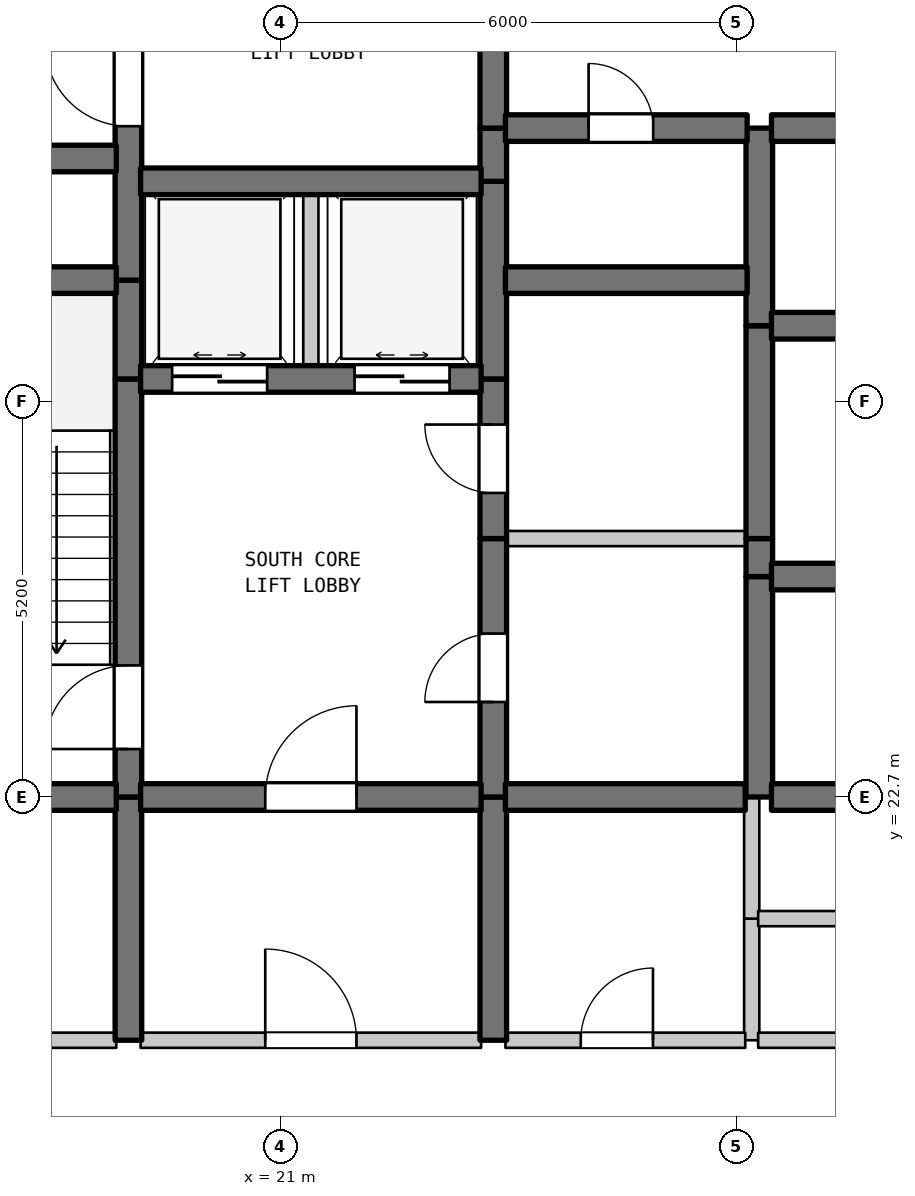
"""IFC4 building model, lengths in metres.
Left out: names, types, materials, properties, quantities, classifications, styles, units other than length and angle.
Written with IfcOpenShell. Run it as: python <this file> out.ifc"""

import sys

from ifc_helpers import new_model, si_unit, direction, frame, frame_2d, origin, place, context, subcontext, project, spatial, rectangle, extrude, element, fill, save


model = new_model("IFC4")
c1 = context("Model", 3, precision=1e-05, world=origin(), true_north=direction((0.0, 1.0)))
c2 = subcontext(c1, "Body", "Model", "MODEL_VIEW")
j1 = project(units=[si_unit("LENGTHUNIT", "METRE"), si_unit("PLANEANGLEUNIT", "RADIAN")], contexts=[c1])
p1 = place(None, origin())
s1 = spatial("IfcSite", under=j1, at=p1, CompositionType="ELEMENT")
p2 = place(p1, origin())
s2 = spatial("IfcBuilding", under=s1, at=p2, CompositionType="ELEMENT")
p3 = place(p2, frame((0.0, 0.0, 242.8)))
s3 = spatial("IfcBuildingStorey", under=s2, at=p3, CompositionType="ELEMENT", Elevation=242.8)
p4 = place(p3, frame((19.0, 19.5, 0.0), z_axis=(0.0, 0.0, 1.0), x_axis=(0.0, 1.0, 0.0)))
e1 = element("IfcWall", 1, at=p4, inside=s3, PredefinedType="SHEAR", context=c2, shape_type="SweptSolid", body=[
    extrude(rectangle(XDim=3.2, YDim=0.35, at=frame_2d((1.6, 0.0))), origin(), (0.0, 0.0, 1.0), 4.19),
])
p5 = place(p3, frame((19.0, 22.7, 0.0), z_axis=(0.0, 0.0, 1.0), x_axis=(0.0, 1.0, 0.0)))
e2 = element("IfcWall", 2, at=p5, inside=s3, PredefinedType="SHEAR", context=c2, shape_type="SweptSolid", body=[
    extrude(rectangle(XDim=5.5, YDim=0.35, at=frame_2d((2.75, 0.0))), origin(), (0.0, 0.0, 1.0), 4.19),
])
p6 = place(p5, frame((0.631, 0.0, 0.0)))
e3 = element("IfcOpeningElement", 3, at=p6, cuts=e2, PredefinedType="OPENING", context=c2, shape_type="SweptSolid", body=[
    extrude(rectangle(XDim=1.1, YDim=2.15, at=frame_2d((0.55, 1.075))), frame((0.0, 0.185, 0.0), z_axis=(0.0, -1.0, 0.0), x_axis=(1.0, 0.0, 0.0)), (0.0, 0.0, 1.0), 0.37),
])
p7 = place(p3, frame((19.0, 28.2, 0.0), z_axis=(0.0, 0.0, 1.0), x_axis=(0.0, 1.0, 0.0)))
e4 = element("IfcWall", 4, at=p7, inside=s3, PredefinedType="SHEAR", context=c2, shape_type="SweptSolid", body=[
    extrude(rectangle(XDim=1.3, YDim=0.35, at=frame_2d((0.65, 0.0))), origin(), (0.0, 0.0, 1.0), 4.19),
])
p8 = place(p3, frame((19.0, 29.5, 0.0), z_axis=(0.0, 0.0, 1.0), x_axis=(0.0, 1.0, 0.0)))
e5 = element("IfcWall", 5, at=p8, inside=s3, PredefinedType="SHEAR", context=c2, shape_type="SweptSolid", body=[
    extrude(rectangle(XDim=5.5, YDim=0.35, at=frame_2d((2.75, 0.0))), origin(), (0.0, 0.0, 1.0), 4.19),
])
p9 = place(p8, frame((2.025, 0.0, 0.0)))
e6 = element("IfcOpeningElement", 6, at=p9, cuts=e5, PredefinedType="OPENING", context=c2, shape_type="SweptSolid", body=[
    extrude(rectangle(XDim=1.1, YDim=2.15, at=frame_2d((0.55, 1.075))), frame((0.0, 0.185, 0.0), z_axis=(0.0, -1.0, 0.0), x_axis=(1.0, 0.0, 0.0)), (0.0, 0.0, 1.0), 0.37),
])
p10 = place(p3, frame((21.4, 28.2, 0.0), z_axis=(0.0, 0.0, 1.0), x_axis=(0.0, 1.0, 0.0)))
e7 = element("IfcWall", 7, at=p10, inside=s3, PredefinedType="STANDARD", context=c2, shape_type="SweptSolid", body=[
    extrude(rectangle(XDim=2.6, YDim=0.2, at=frame_2d((1.3, 0.0))), origin(), (0.0, 0.0, 1.0), 4.19),
])
p11 = place(p3, frame((23.8, 19.5, 0.0), z_axis=(0.0, 0.0, 1.0), x_axis=(0.0, 1.0, 0.0)))
e8 = element("IfcWall", 8, at=p11, inside=s3, PredefinedType="SHEAR", context=c2, shape_type="SweptSolid", body=[
    extrude(rectangle(XDim=3.2, YDim=0.35, at=frame_2d((1.6, 0.0))), origin(), (0.0, 0.0, 1.0), 4.19),
])
p12 = place(p3, frame((23.8, 22.7, 0.0), z_axis=(0.0, 0.0, 1.0), x_axis=(0.0, 1.0, 0.0)))
e9 = element("IfcWall", 9, at=p12, inside=s3, PredefinedType="SHEAR", context=c2, shape_type="SweptSolid", body=[
    extrude(rectangle(XDim=3.4, YDim=0.35, at=frame_2d((1.7, 0.0))), origin(), (0.0, 0.0, 1.0), 4.19),
])
p13 = place(p12, frame((1.25, 0.0, 0.0)))
e10 = element("IfcOpeningElement", 10, at=p13, cuts=e9, PredefinedType="OPENING", context=c2, shape_type="SweptSolid", body=[
    extrude(rectangle(XDim=0.9, YDim=2.15, at=frame_2d((0.45, 1.075))), frame((0.0, 0.185, 0.0), z_axis=(0.0, -1.0, 0.0), x_axis=(1.0, 0.0, 0.0)), (0.0, 0.0, 1.0), 0.37),
])
p14 = place(p3, frame((23.8, 26.1, 0.0), z_axis=(0.0, 0.0, 1.0), x_axis=(0.0, 1.0, 0.0)))
e11 = element("IfcWall", 11, at=p14, inside=s3, PredefinedType="SHEAR", context=c2, shape_type="SweptSolid", body=[
    extrude(rectangle(XDim=2.1, YDim=0.35, at=frame_2d((1.05, 0.0))), origin(), (0.0, 0.0, 1.0), 4.19),
])
p15 = place(p14, frame((0.6, 0.0, 0.0)))
e12 = element("IfcOpeningElement", 12, at=p15, cuts=e11, PredefinedType="OPENING", context=c2, shape_type="SweptSolid", body=[
    extrude(rectangle(XDim=0.9, YDim=2.15, at=frame_2d((0.45, 1.075))), frame((0.0, 0.185, 0.0), z_axis=(0.0, -1.0, 0.0), x_axis=(1.0, 0.0, 0.0)), (0.0, 0.0, 1.0), 0.37),
])
p16 = place(p3, frame((23.8, 28.2, 0.0), z_axis=(0.0, 0.0, 1.0), x_axis=(0.0, 1.0, 0.0)))
e13 = element("IfcWall", 13, at=p16, inside=s3, PredefinedType="SHEAR", context=c2, shape_type="SweptSolid", body=[
    extrude(rectangle(XDim=2.6, YDim=0.35, at=frame_2d((1.3, 0.0))), origin(), (0.0, 0.0, 1.0), 4.19),
])
p17 = place(p3, frame((23.8, 30.8, 0.0), z_axis=(0.0, 0.0, 1.0), x_axis=(0.0, 1.0, 0.0)))
e14 = element("IfcWall", 14, at=p17, inside=s3, PredefinedType="SHEAR", context=c2, shape_type="SweptSolid", body=[
    extrude(rectangle(XDim=0.7, YDim=0.35, at=frame_2d((0.35, 0.0))), origin(), (0.0, 0.0, 1.0), 4.19),
])
p18 = place(p3, frame((23.8, 31.5, 0.0), z_axis=(0.0, 0.0, 1.0), x_axis=(0.0, 1.0, 0.0)))
e15 = element("IfcWall", 15, at=p18, inside=s3, PredefinedType="SHEAR", context=c2, shape_type="SweptSolid", body=[
    extrude(rectangle(XDim=3.5, YDim=0.35, at=frame_2d((1.75, 0.0))), origin(), (0.0, 0.0, 1.0), 4.19),
])
p19 = place(p18, frame((1.127, 0.0, 0.0)))
e16 = element("IfcOpeningElement", 16, at=p19, cuts=e15, PredefinedType="OPENING", context=c2, shape_type="SweptSolid", body=[
    extrude(rectangle(XDim=1.1, YDim=2.15, at=frame_2d((0.55, 1.075))), frame((0.0, 0.185, 0.0), z_axis=(0.0, -1.0, 0.0), x_axis=(1.0, 0.0, 0.0)), (0.0, 0.0, 1.0), 0.37),
])
p20 = place(p3, frame((27.2, 19.5, 0.0), z_axis=(0.0, 0.0, 1.0), x_axis=(0.0, 1.0, 0.0)))
e17 = element("IfcWall", 17, at=p20, inside=s3, PredefinedType="STANDARD", context=c2, shape_type="SweptSolid", body=[
    extrude(rectangle(XDim=1.6, YDim=0.2, at=frame_2d((0.8, 0.0))), origin(), (0.0, 0.0, 1.0), 4.19),
])
p21 = place(p3, frame((27.2, 21.1, 0.0), z_axis=(0.0, 0.0, 1.0), x_axis=(0.0, 1.0, 0.0)))
e18 = element("IfcWall", 18, at=p21, inside=s3, PredefinedType="STANDARD", context=c2, shape_type="SweptSolid", body=[
    extrude(rectangle(XDim=1.6, YDim=0.2, at=frame_2d((0.8, 0.0))), origin(), (0.0, 0.0, 1.0), 4.19),
])
p22 = place(p3, frame((27.3, 22.7, 0.0), z_axis=(0.0, 0.0, 1.0), x_axis=(0.0, 1.0, 0.0)))
e19 = element("IfcWall", 19, at=p22, inside=s3, PredefinedType="SHEAR", context=c2, shape_type="SweptSolid", body=[
    extrude(rectangle(XDim=2.9, YDim=0.35, at=frame_2d((1.45, 0.0))), origin(), (0.0, 0.0, 1.0), 4.19),
])
p23 = place(p3, frame((27.3, 25.6, 0.0), z_axis=(0.0, 0.0, 1.0), x_axis=(0.0, 1.0, 0.0)))
e20 = element("IfcWall", 20, at=p23, inside=s3, PredefinedType="SHEAR", context=c2, shape_type="SweptSolid", body=[
    extrude(rectangle(XDim=0.5, YDim=0.35, at=frame_2d((0.25, 0.0))), origin(), (0.0, 0.0, 1.0), 4.19),
])
p24 = place(p3, frame((27.3, 26.1, 0.0), z_axis=(0.0, 0.0, 1.0), x_axis=(0.0, 1.0, 0.0)))
e21 = element("IfcWall", 21, at=p24, inside=s3, PredefinedType="SHEAR", context=c2, shape_type="SweptSolid", body=[
    extrude(rectangle(XDim=2.8, YDim=0.35, at=frame_2d((1.4, 0.0))), origin(), (0.0, 0.0, 1.0), 4.19),
])
p25 = place(p3, frame((27.3, 28.9, 0.0), z_axis=(0.0, 0.0, 1.0), x_axis=(0.0, 1.0, 0.0)))
e22 = element("IfcWall", 22, at=p25, inside=s3, PredefinedType="SHEAR", context=c2, shape_type="SweptSolid", body=[
    extrude(rectangle(XDim=2.6, YDim=0.35, at=frame_2d((1.3, 0.0))), origin(), (0.0, 0.0, 1.0), 4.19),
])
p26 = place(p3, frame((15.16, 19.5, 0.0), z_axis=(0.0, 0.0, 1.0), x_axis=(1.0, 0.0, 0.0)))
e23 = element("IfcWall", 23, at=p26, inside=s3, PredefinedType="STANDARD", context=c2, shape_type="SweptSolid", body=[
    extrude(rectangle(XDim=3.68, YDim=0.2, at=frame_2d((1.84, 0.0))), origin(), (0.0, 0.0, 1.0), 4.19),
])
p27 = place(p26, frame((1.39, 0.0, 0.0)))
e24 = element("IfcOpeningElement", 24, at=p27, cuts=e23, PredefinedType="OPENING", context=c2, shape_type="SweptSolid", body=[
    extrude(rectangle(XDim=0.9, YDim=2.15, at=frame_2d((0.45, 1.075))), frame((0.0, 0.11, 0.0), z_axis=(0.0, -1.0, 0.0), x_axis=(1.0, 0.0, 0.0)), (0.0, 0.0, 1.0), 0.22),
])
p28 = place(p3, frame((19.16, 19.5, 0.0), z_axis=(0.0, 0.0, 1.0), x_axis=(1.0, 0.0, 0.0)))
e25 = element("IfcWall", 25, at=p28, inside=s3, PredefinedType="STANDARD", context=c2, shape_type="SweptSolid", body=[
    extrude(rectangle(XDim=4.48, YDim=0.2, at=frame_2d((2.24, 0.0))), origin(), (0.0, 0.0, 1.0), 4.19),
])
p29 = place(p28, frame((1.64, 0.0, 0.0)))
e26 = element("IfcOpeningElement", 26, at=p29, cuts=e25, PredefinedType="OPENING", context=c2, shape_type="SweptSolid", body=[
    extrude(rectangle(XDim=1.2, YDim=2.2, at=frame_2d((0.6, 1.1))), frame((0.0, 0.11, 0.0), z_axis=(0.0, -1.0, 0.0), x_axis=(1.0, 0.0, 0.0)), (0.0, 0.0, 1.0), 0.22),
])
p30 = place(p3, frame((23.96, 19.5, 0.0), z_axis=(0.0, 0.0, 1.0), x_axis=(1.0, 0.0, 0.0)))
e27 = element("IfcWall", 27, at=p30, inside=s3, PredefinedType="STANDARD", context=c2, shape_type="SweptSolid", body=[
    extrude(rectangle(XDim=3.155, YDim=0.2, at=frame_2d((1.578, 0.0))), origin(), (0.0, 0.0, 1.0), 4.19),
])
p31 = place(p30, frame((0.991, 0.0, 0.0)))
e28 = element("IfcOpeningElement", 28, at=p31, cuts=e27, PredefinedType="OPENING", context=c2, shape_type="SweptSolid", body=[
    extrude(rectangle(XDim=0.95, YDim=2.15, at=frame_2d((0.475, 1.075))), frame((0.0, 0.11, 0.0), z_axis=(0.0, -1.0, 0.0), x_axis=(1.0, 0.0, 0.0)), (0.0, 0.0, 1.0), 0.22),
])
p32 = place(p3, frame((27.285, 19.5, 0.0), z_axis=(0.0, 0.0, 1.0), x_axis=(1.0, 0.0, 0.0)))
e29 = element("IfcWall", 29, at=p32, inside=s3, PredefinedType="STANDARD", context=c2, shape_type="SweptSolid", body=[
    extrude(rectangle(XDim=3.43, YDim=0.2, at=frame_2d((1.715, 0.0))), origin(), (0.0, 0.0, 1.0), 4.19),
])
p33 = place(p32, frame((1.192, 0.0, 0.0)))
e30 = element("IfcOpeningElement", 30, at=p33, cuts=e29, PredefinedType="OPENING", context=c2, shape_type="SweptSolid", body=[
    extrude(rectangle(XDim=0.9, YDim=2.15, at=frame_2d((0.45, 1.075))), frame((0.0, 0.11, 0.0), z_axis=(0.0, -1.0, 0.0), x_axis=(1.0, 0.0, 0.0)), (0.0, 0.0, 1.0), 0.22),
])
p34 = place(p3, frame((27.285, 21.1, 0.0), z_axis=(0.0, 0.0, 1.0), x_axis=(1.0, 0.0, 0.0)))
e31 = element("IfcWall", 31, at=p34, inside=s3, PredefinedType="STANDARD", context=c2, shape_type="SweptSolid", body=[
    extrude(rectangle(XDim=3.355, YDim=0.2, at=frame_2d((1.677, 0.0))), origin(), (0.0, 0.0, 1.0), 4.19),
])
p35 = place(p3, frame((15.16, 22.7, 0.0), z_axis=(0.0, 0.0, 1.0), x_axis=(1.0, 0.0, 0.0)))
e32 = element("IfcWall", 32, at=p35, inside=s3, PredefinedType="SHEAR", context=c2, shape_type="SweptSolid", body=[
    extrude(rectangle(XDim=3.68, YDim=0.35, at=frame_2d((1.84, 0.0))), origin(), (0.0, 0.0, 1.0), 4.19),
])
p36 = place(p3, frame((19.16, 22.7, 0.0), z_axis=(0.0, 0.0, 1.0), x_axis=(1.0, 0.0, 0.0)))
e33 = element("IfcWall", 33, at=p36, inside=s3, PredefinedType="SHEAR", context=c2, shape_type="SweptSolid", body=[
    extrude(rectangle(XDim=4.48, YDim=0.35, at=frame_2d((2.24, 0.0))), origin(), (0.0, 0.0, 1.0), 4.19),
])
p37 = place(p36, frame((1.64, 0.0, 0.0)))
e34 = element("IfcOpeningElement", 34, at=p37, cuts=e33, PredefinedType="OPENING", context=c2, shape_type="SweptSolid", body=[
    extrude(rectangle(XDim=1.2, YDim=2.2, at=frame_2d((0.6, 1.1))), frame((0.0, 0.185, 0.0), z_axis=(0.0, -1.0, 0.0), x_axis=(1.0, 0.0, 0.0)), (0.0, 0.0, 1.0), 0.37),
])
p38 = place(p3, frame((23.96, 22.7, 0.0), z_axis=(0.0, 0.0, 1.0), x_axis=(1.0, 0.0, 0.0)))
e35 = element("IfcWall", 35, at=p38, inside=s3, PredefinedType="SHEAR", context=c2, shape_type="SweptSolid", body=[
    extrude(rectangle(XDim=3.155, YDim=0.35, at=frame_2d((1.578, 0.0))), origin(), (0.0, 0.0, 1.0), 4.19),
])
p39 = place(p3, frame((27.46, 22.7, 0.0), z_axis=(0.0, 0.0, 1.0), x_axis=(1.0, 0.0, 0.0)))
e36 = element("IfcWall", 36, at=p39, inside=s3, PredefinedType="SHEAR", context=c2, shape_type="SweptSolid", body=[
    extrude(rectangle(XDim=3.18, YDim=0.35, at=frame_2d((1.59, 0.0))), origin(), (0.0, 0.0, 1.0), 4.19),
])
p40 = place(p3, frame((27.46, 25.6, 0.0), z_axis=(0.0, 0.0, 1.0), x_axis=(1.0, 0.0, 0.0)))
e37 = element("IfcWall", 37, at=p40, inside=s3, PredefinedType="SHEAR", context=c2, shape_type="SweptSolid", body=[
    extrude(rectangle(XDim=3.18, YDim=0.35, at=frame_2d((1.59, 0.0))), origin(), (0.0, 0.0, 1.0), 4.19),
])
p41 = place(p40, frame((1.115, 0.0, 0.0)))
e38 = element("IfcOpeningElement", 38, at=p41, cuts=e37, PredefinedType="OPENING", context=c2, shape_type="SweptSolid", body=[
    extrude(rectangle(XDim=0.95, YDim=2.15, at=frame_2d((0.475, 1.075))), frame((0.0, 0.185, 0.0), z_axis=(0.0, -1.0, 0.0), x_axis=(1.0, 0.0, 0.0)), (0.0, 0.0, 1.0), 0.37),
])
p42 = place(p3, frame((23.96, 26.1, 0.0), z_axis=(0.0, 0.0, 1.0), x_axis=(1.0, 0.0, 0.0)))
e39 = element("IfcWall", 39, at=p42, inside=s3, PredefinedType="STANDARD", context=c2, shape_type="SweptSolid", body=[
    extrude(rectangle(XDim=3.18, YDim=0.2, at=frame_2d((1.59, 0.0))), origin(), (0.0, 0.0, 1.0), 4.19),
])
p43 = place(p3, frame((19.16, 28.2, 0.0), z_axis=(0.0, 0.0, 1.0), x_axis=(1.0, 0.0, 0.0)))
e40 = element("IfcWall", 40, at=p43, inside=s3, PredefinedType="SHEAR", context=c2, shape_type="SweptSolid", body=[
    extrude(rectangle(XDim=4.48, YDim=0.35, at=frame_2d((2.24, 0.0))), origin(), (0.0, 0.0, 1.0), 4.19),
])
p44 = place(p43, frame((0.415, 0.0, 0.0)))
e41 = element("IfcOpeningElement", 41, at=p44, cuts=e40, PredefinedType="OPENING", context=c2, shape_type="SweptSolid", body=[
    extrude(rectangle(XDim=1.25, YDim=2.2, at=frame_2d((0.625, 1.1))), frame((0.0, 0.185, 0.0), z_axis=(0.0, -1.0, 0.0), x_axis=(1.0, 0.0, 0.0)), (0.0, 0.0, 1.0), 0.37),
])
p45 = place(p43, frame((2.815, 0.0, 0.0)))
e42 = element("IfcOpeningElement", 42, at=p45, cuts=e40, PredefinedType="OPENING", context=c2, shape_type="SweptSolid", body=[
    extrude(rectangle(XDim=1.25, YDim=2.2, at=frame_2d((0.625, 1.1))), frame((0.0, 0.185, 0.0), z_axis=(0.0, -1.0, 0.0), x_axis=(1.0, 0.0, 0.0)), (0.0, 0.0, 1.0), 0.37),
])
p46 = place(p3, frame((27.46, 28.9, 0.0), z_axis=(0.0, 0.0, 1.0), x_axis=(1.0, 0.0, 0.0)))
e43 = element("IfcWall", 43, at=p46, inside=s3, PredefinedType="SHEAR", context=c2, shape_type="SweptSolid", body=[
    extrude(rectangle(XDim=3.18, YDim=0.35, at=frame_2d((1.59, 0.0))), origin(), (0.0, 0.0, 1.0), 4.19),
])
p47 = place(p46, frame((1.115, 0.0, 0.0)))
e44 = element("IfcOpeningElement", 44, at=p47, cuts=e43, PredefinedType="OPENING", context=c2, shape_type="SweptSolid", body=[
    extrude(rectangle(XDim=0.95, YDim=2.15, at=frame_2d((0.475, 1.075))), frame((0.0, 0.185, 0.0), z_axis=(0.0, -1.0, 0.0), x_axis=(1.0, 0.0, 0.0)), (0.0, 0.0, 1.0), 0.37),
])
p48 = place(p3, frame((15.16, 29.5, 0.0), z_axis=(0.0, 0.0, 1.0), x_axis=(1.0, 0.0, 0.0)))
e45 = element("IfcWall", 45, at=p48, inside=s3, PredefinedType="SHEAR", context=c2, shape_type="SweptSolid", body=[
    extrude(rectangle(XDim=3.68, YDim=0.35, at=frame_2d((1.84, 0.0))), origin(), (0.0, 0.0, 1.0), 4.19),
])
p49 = place(p3, frame((23.96, 29.5, 0.0), z_axis=(0.0, 0.0, 1.0), x_axis=(1.0, 0.0, 0.0)))
e46 = element("IfcWall", 46, at=p49, inside=s3, PredefinedType="SHEAR", context=c2, shape_type="SweptSolid", body=[
    extrude(rectangle(XDim=3.18, YDim=0.35, at=frame_2d((1.59, 0.0))), origin(), (0.0, 0.0, 1.0), 4.19),
])
p50 = place(p3, frame((19.16, 30.8, 0.0), z_axis=(0.0, 0.0, 1.0), x_axis=(1.0, 0.0, 0.0)))
e47 = element("IfcWall", 47, at=p50, inside=s3, PredefinedType="SHEAR", context=c2, shape_type="SweptSolid", body=[
    extrude(rectangle(XDim=4.48, YDim=0.35, at=frame_2d((2.24, 0.0))), origin(), (0.0, 0.0, 1.0), 4.19),
])
p51 = place(p3, frame((15.16, 31.1, 0.0), z_axis=(0.0, 0.0, 1.0), x_axis=(1.0, 0.0, 0.0)))
e48 = element("IfcWall", 48, at=p51, inside=s3, PredefinedType="SHEAR", context=c2, shape_type="SweptSolid", body=[
    extrude(rectangle(XDim=3.68, YDim=0.35, at=frame_2d((1.84, 0.0))), origin(), (0.0, 0.0, 1.0), 4.19),
])
p52 = place(p3, frame((23.96, 31.5, 0.0), z_axis=(0.0, 0.0, 1.0), x_axis=(1.0, 0.0, 0.0)))
e49 = element("IfcWall", 49, at=p52, inside=s3, PredefinedType="SHEAR", context=c2, shape_type="SweptSolid", body=[
    extrude(rectangle(XDim=3.18, YDim=0.35, at=frame_2d((1.59, 0.0))), origin(), (0.0, 0.0, 1.0), 4.19),
])
p53 = place(p52, frame((1.094, 0.0, 0.0)))
e50 = element("IfcOpeningElement", 50, at=p53, cuts=e49, PredefinedType="OPENING", context=c2, shape_type="SweptSolid", body=[
    extrude(rectangle(XDim=0.85, YDim=2.1, at=frame_2d((0.425, 1.05))), frame((0.0, 0.185, 0.0), z_axis=(0.0, -1.0, 0.0), x_axis=(1.0, 0.0, 0.0)), (0.0, 0.0, 1.0), 0.37),
])
p54 = place(p3, frame((27.46, 31.5, 0.0), z_axis=(0.0, 0.0, 1.0), x_axis=(1.0, 0.0, 0.0)))
e51 = element("IfcWall", 51, at=p54, inside=s3, PredefinedType="SHEAR", context=c2, shape_type="SweptSolid", body=[
    extrude(rectangle(XDim=3.18, YDim=0.35, at=frame_2d((1.59, 0.0))), origin(), (0.0, 0.0, 1.0), 4.19),
])
p55 = place(p6, origin())
e52 = element("IfcDoor", 52, at=p55, inside=s3, OperationType="SINGLE_SWING_LEFT", PredefinedType="DOOR", context=c2, shape_type="SweptSolid", body=[
    extrude(rectangle(XDim=1.1, YDim=2.15, at=frame_2d((0.55, 1.075))), frame((0.0, 0.025, 0.0), z_axis=(0.0, -1.0, 0.0), x_axis=(1.0, 0.0, 0.0)), (0.0, 0.0, 1.0), 0.05),
])
fill(e3, e52)
p56 = place(p9, origin())
e53 = element("IfcDoor", 53, at=p56, inside=s3, OperationType="SINGLE_SWING_RIGHT", PredefinedType="DOOR", context=c2, shape_type="SweptSolid", body=[
    extrude(rectangle(XDim=1.1, YDim=2.15, at=frame_2d((0.55, 1.075))), frame((0.0, 0.025, 0.0), z_axis=(0.0, -1.0, 0.0), x_axis=(1.0, 0.0, 0.0)), (0.0, 0.0, 1.0), 0.05),
])
fill(e6, e53)
p57 = place(p13, origin())
e54 = element("IfcDoor", 54, at=p57, inside=s3, OperationType="SINGLE_SWING_LEFT", PredefinedType="DOOR", context=c2, shape_type="SweptSolid", body=[
    extrude(rectangle(XDim=0.9, YDim=2.15, at=frame_2d((0.45, 1.075))), frame((0.0, 0.025, 0.0), z_axis=(0.0, -1.0, 0.0), x_axis=(1.0, 0.0, 0.0)), (0.0, 0.0, 1.0), 0.05),
])
fill(e10, e54)
p58 = place(p15, origin())
e55 = element("IfcDoor", 55, at=p58, inside=s3, OperationType="SINGLE_SWING_RIGHT", PredefinedType="DOOR", context=c2, shape_type="SweptSolid", body=[
    extrude(rectangle(XDim=0.9, YDim=2.15, at=frame_2d((0.45, 1.075))), frame((0.0, 0.025, 0.0), z_axis=(0.0, -1.0, 0.0), x_axis=(1.0, 0.0, 0.0)), (0.0, 0.0, 1.0), 0.05),
])
fill(e12, e55)
p59 = place(p29, origin())
e56 = element("IfcDoor", 56, at=p59, inside=s3, OperationType="SINGLE_SWING_LEFT", PredefinedType="DOOR", context=c2, shape_type="SweptSolid", body=[
    extrude(rectangle(XDim=1.2, YDim=2.2, at=frame_2d((0.6, 1.1))), frame((0.0, 0.025, 0.0), z_axis=(0.0, -1.0, 0.0), x_axis=(1.0, 0.0, 0.0)), (0.0, 0.0, 1.0), 0.05),
])
fill(e26, e56)
p60 = place(p31, origin())
e57 = element("IfcDoor", 57, at=p60, inside=s3, OperationType="SINGLE_SWING_RIGHT", PredefinedType="DOOR", context=c2, shape_type="SweptSolid", body=[
    extrude(rectangle(XDim=0.95, YDim=2.15, at=frame_2d((0.475, 1.075))), frame((0.0, 0.025, 0.0), z_axis=(0.0, -1.0, 0.0), x_axis=(1.0, 0.0, 0.0)), (0.0, 0.0, 1.0), 0.05),
])
fill(e28, e57)
p61 = place(p37, origin())
e58 = element("IfcDoor", 58, at=p61, inside=s3, OperationType="SINGLE_SWING_RIGHT", PredefinedType="DOOR", context=c2, shape_type="SweptSolid", body=[
    extrude(rectangle(XDim=1.2, YDim=2.2, at=frame_2d((0.6, 1.1))), frame((0.0, 0.025, 0.0), z_axis=(0.0, -1.0, 0.0), x_axis=(1.0, 0.0, 0.0)), (0.0, 0.0, 1.0), 0.05),
])
fill(e34, e58)
p62 = place(p44, origin())
e59 = element("IfcDoor", 59, at=p62, inside=s3, OperationType="DOUBLE_DOOR_SLIDING", PredefinedType="DOOR", context=c2, shape_type="SweptSolid", body=[
    extrude(rectangle(XDim=1.25, YDim=2.2, at=frame_2d((0.625, 1.1))), frame((0.0, 0.025, 0.0), z_axis=(0.0, -1.0, 0.0), x_axis=(1.0, 0.0, 0.0)), (0.0, 0.0, 1.0), 0.05),
])
fill(e41, e59)
p63 = place(p45, origin())
e60 = element("IfcDoor", 60, at=p63, inside=s3, OperationType="DOUBLE_DOOR_SLIDING", PredefinedType="DOOR", context=c2, shape_type="SweptSolid", body=[
    extrude(rectangle(XDim=1.25, YDim=2.2, at=frame_2d((0.625, 1.1))), frame((0.0, 0.025, 0.0), z_axis=(0.0, -1.0, 0.0), x_axis=(1.0, 0.0, 0.0)), (0.0, 0.0, 1.0), 0.05),
])
fill(e42, e60)
p64 = place(p53, origin())
e61 = element("IfcDoor", 61, at=p64, inside=s3, OperationType="SINGLE_SWING_LEFT", PredefinedType="DOOR", context=c2, shape_type="SweptSolid", body=[
    extrude(rectangle(XDim=0.85, YDim=2.1, at=frame_2d((0.425, 1.05))), frame((0.0, 0.025, 0.0), z_axis=(0.0, -1.0, 0.0), x_axis=(1.0, 0.0, 0.0)), (0.0, 0.0, 1.0), 0.05),
])
fill(e50, e61)
save(model, sys.argv[1])
